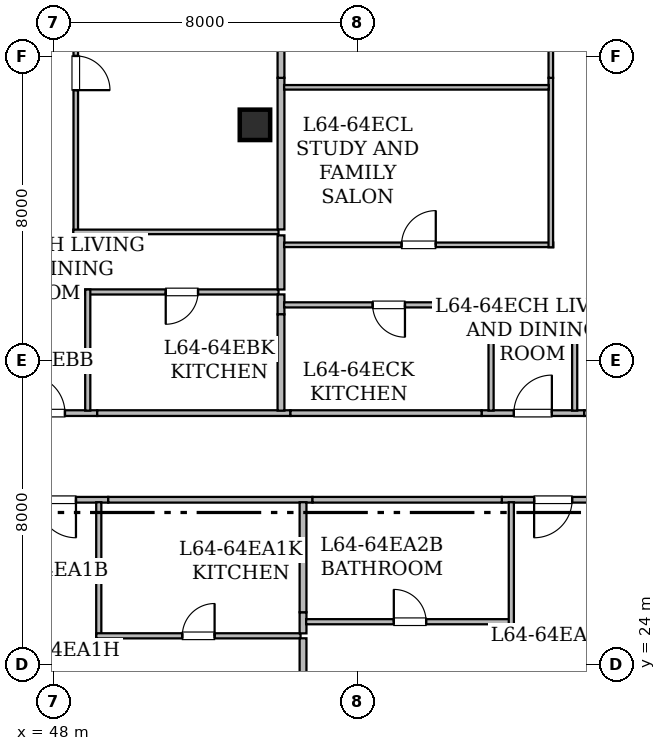
"""IFC4 building model, lengths in metres.
Left out: names, types, materials, properties, quantities, classifications, styles, units other than length and angle.
Written with IfcOpenShell. Run it as: python <this file> out.ifc"""

import sys

from ifc_helpers import new_model, si_unit, direction, frame, frame_2d, origin, origin_2d, place, context, subcontext, project, spatial, rectangle, hollow_rectangle, extrude, element, fill, save


model = new_model("IFC4")
c1 = context("Model", 3, precision=1e-05, world=origin(), true_north=direction((0.0, 1.0)))
c2 = subcontext(c1, "Body", "Model", "MODEL_VIEW")
j1 = project(units=[si_unit("LENGTHUNIT", "METRE"), si_unit("PLANEANGLEUNIT", "RADIAN")], contexts=[c1])
p1 = place(None, origin())
s1 = spatial("IfcSite", under=j1, at=p1, CompositionType="ELEMENT")
p2 = place(p1, origin())
s2 = spatial("IfcBuilding", under=s1, at=p2, CompositionType="ELEMENT")
p3 = place(p2, frame((0.0, 0.0, 250.05)))
s3 = spatial("IfcBuildingStorey", under=s2, at=p3, CompositionType="ELEMENT", Elevation=250.05)
p4 = place(p3, frame((53.3, 38.2, 0.0), z_axis=(0.0, 0.0, 1.0), x_axis=(1.0, 0.0, 0.0)))
e1 = element("IfcColumn", 1, at=p4, inside=s3, PredefinedType="COLUMN", context=c2, shape_type="SweptSolid", body=[
    extrude(hollow_rectangle(XDim=0.8, YDim=0.8, WallThickness=0.04, at=origin_2d()), origin(), (0.0, 0.0, 1.0), 3.65),
])
p5 = place(p3, frame((49.439, 28.335, 0.0), z_axis=(0.0, 0.0, 1.0), x_axis=(-1.0, 0.0, 0.0)))
e2 = element("IfcWall", 2, at=p5, inside=s3, PredefinedType="STANDARD", context=c2, shape_type="SweptSolid", body=[
    extrude(rectangle(XDim=2.698, YDim=0.15, at=frame_2d((1.349, 0.0))), origin(), (0.0, 0.0, 1.0), 3.43),
])
p6 = place(p5, frame((0.849, 0.0, 0.0)))
e3 = element("IfcOpeningElement", 3, at=p6, cuts=e2, PredefinedType="OPENING", context=c2, shape_type="SweptSolid", body=[
    extrude(rectangle(XDim=1.0, YDim=2.15, at=frame_2d((0.5, 1.075))), frame((0.0, 0.085, 0.0), z_axis=(0.0, -1.0, 0.0), x_axis=(1.0, 0.0, 0.0)), (0.0, 0.0, 1.0), 0.17),
])
p7 = place(p3, frame((54.814, 28.335, 0.0), z_axis=(0.0, 0.0, 1.0), x_axis=(-1.0, 0.0, 0.0)))
e4 = element("IfcWall", 4, at=p7, inside=s3, PredefinedType="STANDARD", context=c2, shape_type="SweptSolid", body=[
    extrude(rectangle(XDim=5.375, YDim=0.15, at=frame_2d((2.688, 0.0))), origin(), (0.0, 0.0, 1.0), 2.725),
])
p8 = place(p3, frame((62.495, 28.335, 0.0), z_axis=(0.0, 0.0, 1.0), x_axis=(-1.0, 0.0, 0.0)))
e5 = element("IfcWall", 5, at=p8, inside=s3, PredefinedType="STANDARD", context=c2, shape_type="SweptSolid", body=[
    extrude(rectangle(XDim=2.699, YDim=0.15, at=frame_2d((1.35, 0.0))), origin(), (0.0, 0.0, 1.0), 3.43),
])
p9 = place(p8, frame((0.849, 0.0, 0.0)))
e6 = element("IfcOpeningElement", 6, at=p9, cuts=e5, PredefinedType="OPENING", context=c2, shape_type="SweptSolid", body=[
    extrude(rectangle(XDim=1.0, YDim=2.15, at=frame_2d((0.5, 1.075))), frame((0.0, 0.085, 0.0), z_axis=(0.0, -1.0, 0.0), x_axis=(1.0, 0.0, 0.0)), (0.0, 0.0, 1.0), 0.17),
])
p10 = place(p3, frame((59.796, 28.335, 0.0), z_axis=(0.0, 0.0, 1.0), x_axis=(-1.0, 0.0, 0.0)))
e7 = element("IfcWall", 7, at=p10, inside=s3, PredefinedType="STANDARD", context=c2, shape_type="SweptSolid", body=[
    extrude(rectangle(XDim=4.982, YDim=0.15, at=frame_2d((2.491, 0.0))), origin(), (0.0, 0.0, 1.0), 3.43),
])
p11 = place(p3, frame((46.451, 30.615, 0.0), z_axis=(0.0, 0.0, 1.0), x_axis=(1.0, 0.0, 0.0)))
e8 = element("IfcWall", 8, at=p11, inside=s3, PredefinedType="STANDARD", context=c2, shape_type="SweptSolid", body=[
    extrude(rectangle(XDim=2.698, YDim=0.15, at=frame_2d((1.349, 0.0))), origin(), (0.0, 0.0, 1.0), 3.43),
])
p12 = place(p11, frame((0.849, 0.0, 0.0)))
e9 = element("IfcOpeningElement", 9, at=p12, cuts=e8, PredefinedType="OPENING", context=c2, shape_type="SweptSolid", body=[
    extrude(rectangle(XDim=1.0, YDim=2.15, at=frame_2d((0.5, 1.075))), frame((0.0, 0.085, 0.0), z_axis=(0.0, -1.0, 0.0), x_axis=(1.0, 0.0, 0.0)), (0.0, 0.0, 1.0), 0.17),
])
p13 = place(p3, frame((49.149, 30.615, 0.0), z_axis=(0.0, 0.0, 1.0), x_axis=(1.0, 0.0, 0.0)))
e10 = element("IfcWall", 10, at=p13, inside=s3, PredefinedType="STANDARD", context=c2, shape_type="SweptSolid", body=[
    extrude(rectangle(XDim=5.085, YDim=0.15, at=frame_2d((2.542, 0.0))), origin(), (0.0, 0.0, 1.0), 2.725),
])
p14 = place(p3, frame((59.264, 30.615, 0.0), z_axis=(0.0, 0.0, 1.0), x_axis=(1.0, 0.0, 0.0)))
e11 = element("IfcWall", 11, at=p14, inside=s3, PredefinedType="STANDARD", context=c2, shape_type="SweptSolid", body=[
    extrude(rectangle(XDim=2.698, YDim=0.15, at=frame_2d((1.349, 0.0))), origin(), (0.0, 0.0, 1.0), 3.43),
])
p15 = place(p14, frame((0.849, 0.0, 0.0)))
e12 = element("IfcOpeningElement", 12, at=p15, cuts=e11, PredefinedType="OPENING", context=c2, shape_type="SweptSolid", body=[
    extrude(rectangle(XDim=1.0, YDim=2.15, at=frame_2d((0.5, 1.075))), frame((0.0, 0.085, 0.0), z_axis=(0.0, -1.0, 0.0), x_axis=(1.0, 0.0, 0.0)), (0.0, 0.0, 1.0), 0.17),
])
p16 = place(p3, frame((61.962, 30.615, 0.0), z_axis=(0.0, 0.0, 1.0), x_axis=(1.0, 0.0, 0.0)))
e13 = element("IfcWall", 13, at=p16, inside=s3, PredefinedType="STANDARD", context=c2, shape_type="SweptSolid", body=[
    extrude(rectangle(XDim=4.367, YDim=0.15, at=frame_2d((2.184, 0.0))), origin(), (0.0, 0.0, 1.0), 3.43),
])
p17 = place(p3, frame((54.234, 30.615, 0.0), z_axis=(0.0, 0.0, 1.0), x_axis=(1.0, 0.0, 0.0)))
e14 = element("IfcWall", 14, at=p17, inside=s3, PredefinedType="STANDARD", context=c2, shape_type="SweptSolid", body=[
    extrude(rectangle(XDim=5.03, YDim=0.15, at=frame_2d((2.515, 0.0))), origin(), (0.0, 0.0, 1.0), 3.43),
])
p18 = place(p3, frame((49.19, 28.27, 0.0), z_axis=(0.0, 0.0, 1.0), x_axis=(0.0, -1.0, 0.0)))
e15 = element("IfcWall", 15, at=p18, inside=s3, PredefinedType="PARTITIONING", context=c2, shape_type="SweptSolid", body=[
    extrude(rectangle(XDim=3.58, YDim=0.135, at=frame_2d((1.79, 0.0))), origin(), (0.0, 0.0, 1.0), 3.43),
])
p19 = place(p3, frame((49.125, 24.755, 0.0), z_axis=(0.0, 0.0, 1.0), x_axis=(1.0, 0.0, 0.0)))
e16 = element("IfcWall", 16, at=p19, inside=s3, PredefinedType="PARTITIONING", context=c2, shape_type="SweptSolid", body=[
    extrude(rectangle(XDim=5.375, YDim=0.135, at=frame_2d((2.688, 0.0))), origin(), (0.0, 0.0, 1.0), 2.725),
])
p20 = place(p19, frame((2.263, 0.0, 0.0)))
e17 = element("IfcOpeningElement", 17, at=p20, cuts=e16, PredefinedType="OPENING", context=c2, shape_type="SweptSolid", body=[
    extrude(rectangle(XDim=0.85, YDim=2.1, at=frame_2d((0.425, 1.05))), frame((0.0, 0.077, 0.0), z_axis=(0.0, -1.0, 0.0), x_axis=(1.0, 0.0, 0.0)), (0.0, 0.0, 1.0), 0.155),
])
p21 = place(p3, frame((54.565, 24.69, 0.0), z_axis=(0.0, 0.0, 1.0), x_axis=(0.0, -1.0, 0.0)))
e18 = element("IfcWall", 18, at=p21, inside=s3, PredefinedType="STANDARD", context=c2, shape_type="SweptSolid", body=[
    extrude(rectangle(XDim=1.393, YDim=0.18, at=frame_2d((0.696, 0.0))), origin(), (0.0, 0.0, 1.0), 3.43),
])
p22 = place(p3, frame((54.565, 25.375, 0.0), z_axis=(0.0, 0.0, 1.0), x_axis=(0.0, -1.0, 0.0)))
e19 = element("IfcWall", 19, at=p22, inside=s3, PredefinedType="STANDARD", context=c2, shape_type="SweptSolid", body=[
    extrude(rectangle(XDim=0.555, YDim=0.18, at=frame_2d((0.277, 0.0))), origin(), (0.0, 0.0, 1.0), 3.43),
])
p23 = place(p3, frame((54.565, 28.27, 0.0), z_axis=(0.0, 0.0, 1.0), x_axis=(0.0, -1.0, 0.0)))
e20 = element("IfcWall", 20, at=p23, inside=s3, PredefinedType="STANDARD", context=c2, shape_type="SweptSolid", body=[
    extrude(rectangle(XDim=2.895, YDim=0.18, at=frame_2d((1.448, 0.0))), origin(), (0.0, 0.0, 1.0), 3.43),
])
p24 = place(p3, frame((54.647, 25.126, 0.0), z_axis=(0.0, 0.0, 1.0), x_axis=(1.0, 0.0, 0.0)))
e21 = element("IfcWall", 21, at=p24, inside=s3, PredefinedType="PARTITIONING", context=c2, shape_type="SweptSolid", body=[
    extrude(rectangle(XDim=5.464, YDim=0.135, at=frame_2d((2.732, 0.0))), origin(), (0.0, 0.0, 1.0), 3.43),
])
p25 = place(p24, frame((2.307, 0.0, 0.0)))
e22 = element("IfcOpeningElement", 22, at=p25, cuts=e21, PredefinedType="OPENING", context=c2, shape_type="SweptSolid", body=[
    extrude(rectangle(XDim=0.85, YDim=2.1, at=frame_2d((0.425, 1.05))), frame((0.0, 0.077, 0.0), z_axis=(0.0, -1.0, 0.0), x_axis=(1.0, 0.0, 0.0)), (0.0, 0.0, 1.0), 0.155),
])
p26 = place(p3, frame((60.046, 25.061, 0.0), z_axis=(0.0, 0.0, 1.0), x_axis=(0.0, 1.0, 0.0)))
e23 = element("IfcWall", 23, at=p26, inside=s3, PredefinedType="PARTITIONING", context=c2, shape_type="SweptSolid", body=[
    extrude(rectangle(XDim=3.209, YDim=0.135, at=frame_2d((1.604, 0.0))), origin(), (0.0, 0.0, 1.0), 3.43),
])
p27 = place(p3, frame((53.92, 33.803, 0.0), z_axis=(0.0, 0.0, 1.0), x_axis=(-1.0, 0.0, 0.0)))
e24 = element("IfcWall", 24, at=p27, inside=s3, PredefinedType="PARTITIONING", context=c2, shape_type="SweptSolid", body=[
    extrude(rectangle(XDim=5.085, YDim=0.135, at=frame_2d((2.542, 0.0))), origin(), (0.0, 0.0, 1.0), 2.725),
])
p28 = place(p27, frame((2.118, 0.0, 0.0)))
e25 = element("IfcOpeningElement", 25, at=p28, cuts=e24, PredefinedType="OPENING", context=c2, shape_type="SweptSolid", body=[
    extrude(rectangle(XDim=0.85, YDim=2.1, at=frame_2d((0.425, 1.05))), frame((0.0, 0.077, 0.0), z_axis=(0.0, -1.0, 0.0), x_axis=(1.0, 0.0, 0.0)), (0.0, 0.0, 1.0), 0.155),
])
p29 = place(p3, frame((48.9, 33.868, 0.0), z_axis=(0.0, 0.0, 1.0), x_axis=(0.0, -1.0, 0.0)))
e26 = element("IfcWall", 26, at=p29, inside=s3, PredefinedType="PARTITIONING", context=c2, shape_type="SweptSolid", body=[
    extrude(rectangle(XDim=3.188, YDim=0.135, at=frame_2d((1.594, 0.0))), origin(), (0.0, 0.0, 1.0), 2.961),
])
p30 = place(p3, frame((48.585, 43.808, 0.0), z_axis=(0.0, 0.0, 1.0), x_axis=(0.0, -1.0, 0.0)))
e27 = element("IfcWall", 27, at=p30, inside=s3, PredefinedType="PARTITIONING", context=c2, shape_type="SweptSolid", body=[
    extrude(rectangle(XDim=8.49, YDim=0.12, at=frame_2d((4.245, 0.0))), origin(), (0.0, 0.0, 1.0), 2.725),
])
p31 = place(p30, frame((3.795, 0.0, 0.0)))
e28 = element("IfcOpeningElement", 28, at=p31, cuts=e27, PredefinedType="OPENING", context=c2, shape_type="SweptSolid", body=[
    extrude(rectangle(XDim=0.9, YDim=2.1, at=frame_2d((0.45, 1.05))), frame((0.0, 0.07, 0.0), z_axis=(0.0, -1.0, 0.0), x_axis=(1.0, 0.0, 0.0)), (0.0, 0.0, 1.0), 0.14),
])
p32 = place(p3, frame((48.52, 35.383, 0.0), z_axis=(0.0, 0.0, 1.0), x_axis=(1.0, 0.0, 0.0)))
e29 = element("IfcWall", 29, at=p32, inside=s3, PredefinedType="PARTITIONING", context=c2, shape_type="SweptSolid", body=[
    extrude(rectangle(XDim=5.4, YDim=0.12, at=frame_2d((2.7, 0.0))), origin(), (0.0, 0.0, 1.0), 2.725),
])
p33 = place(p3, frame((53.985, 35.292, 0.0), z_axis=(0.0, 0.0, 1.0), x_axis=(0.0, -1.0, 0.0)))
e30 = element("IfcWall", 30, at=p33, inside=s3, PredefinedType="STANDARD", context=c2, shape_type="SweptSolid", body=[
    extrude(rectangle(XDim=1.424, YDim=0.18, at=frame_2d((0.712, 0.0))), origin(), (0.0, 0.0, 1.0), 3.43),
])
p34 = place(p3, frame((53.985, 33.738, 0.0), z_axis=(0.0, 0.0, 1.0), x_axis=(0.0, -1.0, 0.0)))
e31 = element("IfcWall", 31, at=p34, inside=s3, PredefinedType="STANDARD", context=c2, shape_type="SweptSolid", body=[
    extrude(rectangle(XDim=0.524, YDim=0.18, at=frame_2d((0.262, 0.0))), origin(), (0.0, 0.0, 1.0), 2.961),
])
p35 = place(p3, frame((53.985, 33.214, 0.0), z_axis=(0.0, 0.0, 1.0), x_axis=(0.0, -1.0, 0.0)))
e32 = element("IfcWall", 32, at=p35, inside=s3, PredefinedType="STANDARD", context=c2, shape_type="SweptSolid", body=[
    extrude(rectangle(XDim=2.534, YDim=0.18, at=frame_2d((1.267, 0.0))), origin(), (0.0, 0.0, 1.0), 3.43),
])
p36 = place(p3, frame((53.985, 39.436, 0.0), z_axis=(0.0, 0.0, 1.0), x_axis=(0.0, -1.0, 0.0)))
e33 = element("IfcWall", 33, at=p36, inside=s3, PredefinedType="STANDARD", context=c2, shape_type="SweptSolid", body=[
    extrude(rectangle(XDim=3.988, YDim=0.18, at=frame_2d((1.994, 0.0))), origin(), (0.0, 0.0, 1.0), 2.725),
])
p37 = place(p3, frame((53.985, 43.808, 0.0), z_axis=(0.0, 0.0, 1.0), x_axis=(0.0, -1.0, 0.0)))
e34 = element("IfcWall", 34, at=p37, inside=s3, PredefinedType="STANDARD", context=c2, shape_type="SweptSolid", body=[
    extrude(rectangle(XDim=4.372, YDim=0.18, at=frame_2d((2.186, 0.0))), origin(), (0.0, 0.0, 1.0), 2.887),
])
p38 = place(p3, frame((66.643, 33.463, 0.0), z_axis=(0.0, 0.0, 1.0), x_axis=(-1.0, 0.0, 0.0)))
e35 = element("IfcWall", 35, at=p38, inside=s3, PredefinedType="PARTITIONING", context=c2, shape_type="SweptSolid", body=[
    extrude(rectangle(XDim=4.995, YDim=0.135, at=frame_2d((2.498, 0.0))), origin(), (0.0, 0.0, 1.0), 2.961),
])
p39 = place(p38, frame((2.073, 0.0, 0.0)))
e36 = element("IfcOpeningElement", 36, at=p39, cuts=e35, PredefinedType="OPENING", context=c2, shape_type="SweptSolid", body=[
    extrude(rectangle(XDim=0.85, YDim=2.1, at=frame_2d((0.425, 1.05))), frame((0.0, 0.077, 0.0), z_axis=(0.0, -1.0, 0.0), x_axis=(1.0, 0.0, 0.0)), (0.0, 0.0, 1.0), 0.155),
])
for number, where, z_axis, x_axis in (
    (37, (61.713, 33.528, 0.0), (0.0, 0.0, 1.0), (0.0, -1.0, 0.0)),
    (38, (59.513, 30.68, 0.0), (0.0, 0.0, 1.0), (0.0, 1.0, 0.0)),
):
    element("IfcWall", number, at=place(p3, frame(where, z_axis=z_axis, x_axis=x_axis)), inside=s3, PredefinedType="PARTITIONING", context=c2, shape_type="SweptSolid", body=[
        extrude(rectangle(XDim=2.848, YDim=0.135, at=frame_2d((1.424, 0.0))), origin(), (0.0, 0.0, 1.0), 2.961),
    ])
p40 = place(p3, frame((59.578, 33.463, 0.0), z_axis=(0.0, 0.0, 1.0), x_axis=(-1.0, 0.0, 0.0)))
e39 = element("IfcWall", 39, at=p40, inside=s3, PredefinedType="PARTITIONING", context=c2, shape_type="SweptSolid", body=[
    extrude(rectangle(XDim=5.511, YDim=0.135, at=frame_2d((2.755, 0.0))), origin(), (0.0, 0.0, 1.0), 2.961),
])
p41 = place(p40, frame((2.331, 0.0, 0.0)))
e40 = element("IfcOpeningElement", 40, at=p41, cuts=e39, PredefinedType="OPENING", context=c2, shape_type="SweptSolid", body=[
    extrude(rectangle(XDim=0.85, YDim=2.1, at=frame_2d((0.425, 1.05))), frame((0.0, 0.077, 0.0), z_axis=(0.0, -1.0, 0.0), x_axis=(1.0, 0.0, 0.0)), (0.0, 0.0, 1.0), 0.155),
])
p42 = place(p3, frame((54.067, 35.043, 0.0), z_axis=(0.0, 0.0, 1.0), x_axis=(1.0, 0.0, 0.0)))
e41 = element("IfcWall", 41, at=p42, inside=s3, PredefinedType="PARTITIONING", context=c2, shape_type="SweptSolid", body=[
    extrude(rectangle(XDim=7.083, YDim=0.12, at=frame_2d((3.542, 0.0))), origin(), (0.0, 0.0, 1.0), 3.43),
])
p43 = place(p42, frame((3.091, 0.0, 0.0)))
e42 = element("IfcOpeningElement", 42, at=p43, cuts=e41, PredefinedType="OPENING", context=c2, shape_type="SweptSolid", body=[
    extrude(rectangle(XDim=0.9, YDim=2.1, at=frame_2d((0.45, 1.05))), frame((0.0, 0.07, 0.0), z_axis=(0.0, -1.0, 0.0), x_axis=(1.0, 0.0, 0.0)), (0.0, 0.0, 1.0), 0.14),
])
p44 = place(p3, frame((61.085, 34.978, 0.0), z_axis=(0.0, 0.0, 1.0), x_axis=(0.0, 1.0, 0.0)))
e43 = element("IfcWall", 43, at=p44, inside=s3, PredefinedType="PARTITIONING", context=c2, shape_type="SweptSolid", body=[
    extrude(rectangle(XDim=4.458, YDim=0.12, at=frame_2d((2.229, 0.0))), origin(), (0.0, 0.0, 1.0), 2.725),
])
p45 = place(p3, frame((61.085, 39.436, 0.0), z_axis=(0.0, 0.0, 1.0), x_axis=(0.0, 1.0, 0.0)))
e44 = element("IfcWall", 44, at=p45, inside=s3, PredefinedType="PARTITIONING", context=c2, shape_type="SweptSolid", body=[
    extrude(rectangle(XDim=4.372, YDim=0.12, at=frame_2d((2.186, 0.0))), origin(), (0.0, 0.0, 1.0), 2.725),
])
p46 = place(p45, frame((1.736, 0.0, 0.0)))
e45 = element("IfcOpeningElement", 45, at=p46, cuts=e44, PredefinedType="OPENING", context=c2, shape_type="SweptSolid", body=[
    extrude(rectangle(XDim=0.9, YDim=2.1, at=frame_2d((0.45, 1.05))), frame((0.0, 0.07, 0.0), z_axis=(0.0, -1.0, 0.0), x_axis=(1.0, 0.0, 0.0)), (0.0, 0.0, 1.0), 0.14),
])
p47 = place(p3, frame((54.067, 39.187, 0.0), z_axis=(0.0, 0.0, 1.0), x_axis=(1.0, 0.0, 0.0)))
e46 = element("IfcWall", 46, at=p47, inside=s3, PredefinedType="PARTITIONING", context=c2, shape_type="SweptSolid", body=[
    extrude(rectangle(XDim=6.964, YDim=0.12, at=frame_2d((3.482, 0.0))), origin(), (0.0, 0.0, 1.0), 2.725),
])
p48 = place(p6, origin())
e47 = element("IfcDoor", 47, at=p48, inside=s3, OperationType="SINGLE_SWING_LEFT", PredefinedType="DOOR", context=c2, shape_type="SweptSolid", body=[
    extrude(rectangle(XDim=1.0, YDim=2.15, at=frame_2d((0.5, 1.075))), frame((0.0, 0.025, 0.0), z_axis=(0.0, -1.0, 0.0), x_axis=(1.0, 0.0, 0.0)), (0.0, 0.0, 1.0), 0.05),
])
fill(e3, e47)
p49 = place(p9, origin())
e48 = element("IfcDoor", 48, at=p49, inside=s3, OperationType="SINGLE_SWING_RIGHT", PredefinedType="DOOR", context=c2, shape_type="SweptSolid", body=[
    extrude(rectangle(XDim=1.0, YDim=2.15, at=frame_2d((0.5, 1.075))), frame((0.0, 0.025, 0.0), z_axis=(0.0, -1.0, 0.0), x_axis=(1.0, 0.0, 0.0)), (0.0, 0.0, 1.0), 0.05),
])
fill(e6, e48)
p50 = place(p12, origin())
e49 = element("IfcDoor", 49, at=p50, inside=s3, OperationType="SINGLE_SWING_LEFT", PredefinedType="DOOR", context=c2, shape_type="SweptSolid", body=[
    extrude(rectangle(XDim=1.0, YDim=2.15, at=frame_2d((0.5, 1.075))), frame((0.0, 0.025, 0.0), z_axis=(0.0, -1.0, 0.0), x_axis=(1.0, 0.0, 0.0)), (0.0, 0.0, 1.0), 0.05),
])
fill(e9, e49)
p51 = place(p15, origin())
e50 = element("IfcDoor", 50, at=p51, inside=s3, OperationType="SINGLE_SWING_RIGHT", PredefinedType="DOOR", context=c2, shape_type="SweptSolid", body=[
    extrude(rectangle(XDim=1.0, YDim=2.15, at=frame_2d((0.5, 1.075))), frame((0.0, 0.025, 0.0), z_axis=(0.0, -1.0, 0.0), x_axis=(1.0, 0.0, 0.0)), (0.0, 0.0, 1.0), 0.05),
])
fill(e12, e50)
p52 = place(p20, origin())
e51 = element("IfcDoor", 51, at=p52, inside=s3, OperationType="SINGLE_SWING_RIGHT", PredefinedType="DOOR", context=c2, shape_type="SweptSolid", body=[
    extrude(rectangle(XDim=0.85, YDim=2.1, at=frame_2d((0.425, 1.05))), frame((0.0, 0.025, 0.0), z_axis=(0.0, -1.0, 0.0), x_axis=(1.0, 0.0, 0.0)), (0.0, 0.0, 1.0), 0.05),
])
fill(e17, e51)
p53 = place(p25, origin())
e52 = element("IfcDoor", 52, at=p53, inside=s3, OperationType="SINGLE_SWING_LEFT", PredefinedType="DOOR", context=c2, shape_type="SweptSolid", body=[
    extrude(rectangle(XDim=0.85, YDim=2.1, at=frame_2d((0.425, 1.05))), frame((0.0, 0.025, 0.0), z_axis=(0.0, -1.0, 0.0), x_axis=(1.0, 0.0, 0.0)), (0.0, 0.0, 1.0), 0.05),
])
fill(e22, e52)
p54 = place(p28, origin())
e53 = element("IfcDoor", 53, at=p54, inside=s3, OperationType="SINGLE_SWING_RIGHT", PredefinedType="DOOR", context=c2, shape_type="SweptSolid", body=[
    extrude(rectangle(XDim=0.85, YDim=2.1, at=frame_2d((0.425, 1.05))), frame((0.0, 0.025, 0.0), z_axis=(0.0, -1.0, 0.0), x_axis=(1.0, 0.0, 0.0)), (0.0, 0.0, 1.0), 0.05),
])
fill(e25, e53)
p55 = place(p31, origin())
e54 = element("IfcDoor", 54, at=p55, inside=s3, OperationType="SINGLE_SWING_RIGHT", PredefinedType="DOOR", context=c2, shape_type="SweptSolid", body=[
    extrude(rectangle(XDim=0.9, YDim=2.1, at=frame_2d((0.45, 1.05))), frame((0.0, 0.025, 0.0), z_axis=(0.0, -1.0, 0.0), x_axis=(1.0, 0.0, 0.0)), (0.0, 0.0, 1.0), 0.05),
])
fill(e28, e54)
p56 = place(p41, origin())
e55 = element("IfcDoor", 55, at=p56, inside=s3, OperationType="SINGLE_SWING_LEFT", PredefinedType="DOOR", context=c2, shape_type="SweptSolid", body=[
    extrude(rectangle(XDim=0.85, YDim=2.1, at=frame_2d((0.425, 1.05))), frame((0.0, 0.025, 0.0), z_axis=(0.0, -1.0, 0.0), x_axis=(1.0, 0.0, 0.0)), (0.0, 0.0, 1.0), 0.05),
])
fill(e40, e55)
p57 = place(p43, origin())
e56 = element("IfcDoor", 56, at=p57, inside=s3, OperationType="SINGLE_SWING_RIGHT", PredefinedType="DOOR", context=c2, shape_type="SweptSolid", body=[
    extrude(rectangle(XDim=0.9, YDim=2.1, at=frame_2d((0.45, 1.05))), frame((0.0, 0.025, 0.0), z_axis=(0.0, -1.0, 0.0), x_axis=(1.0, 0.0, 0.0)), (0.0, 0.0, 1.0), 0.05),
])
fill(e42, e56)
save(model, sys.argv[1])
